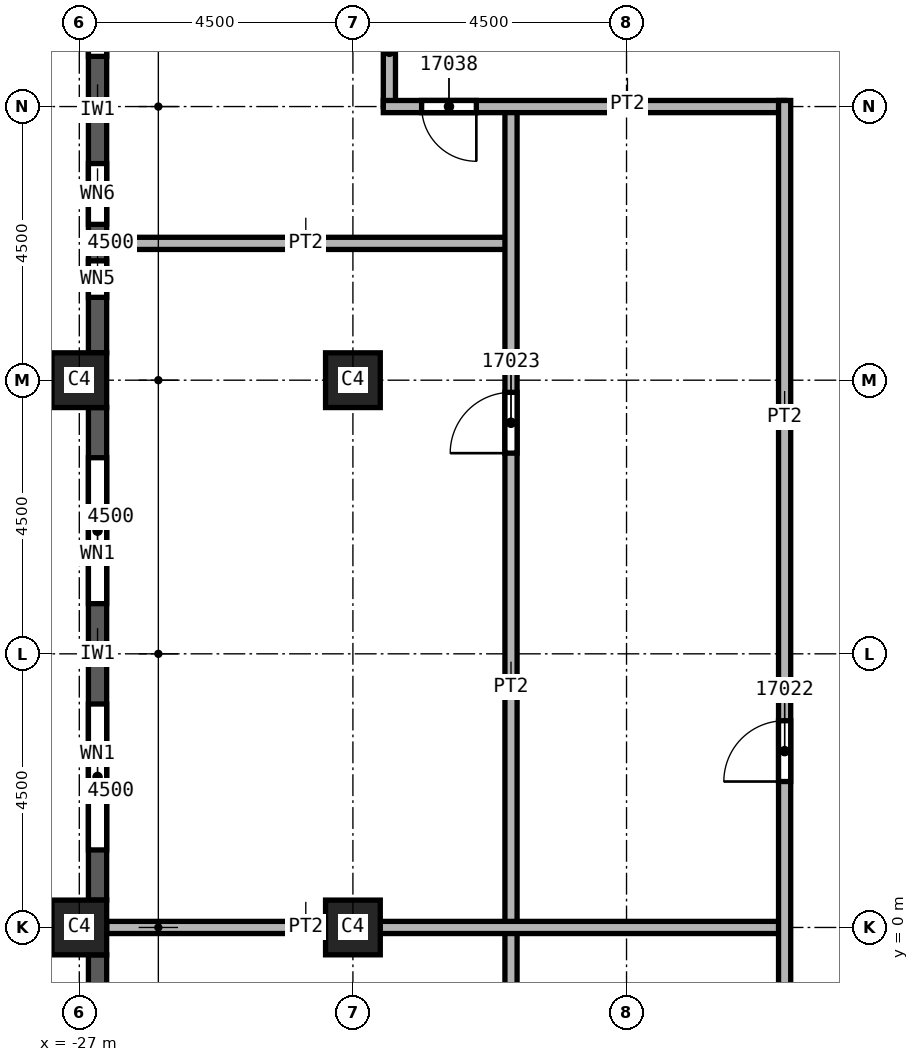
"""IFC4 building model, lengths in metres.
Left out: names, types, materials, properties, quantities, classifications, styles, units other than length and angle.
Written with IfcOpenShell. Run it as: python <this file> out.ifc"""

import sys

from ifc_helpers import new_model, si_unit, direction, frame, frame_2d, origin, origin_2d, place, context, subcontext, project, spatial, rectangle, extrude, element, fill, save


model = new_model("IFC4")
c1 = context("Model", 3, precision=1e-05, world=origin(), true_north=direction((0.0, 1.0)))
c2 = subcontext(c1, "Body", "Model", "MODEL_VIEW")
j1 = project(units=[si_unit("LENGTHUNIT", "METRE"), si_unit("PLANEANGLEUNIT", "RADIAN")], contexts=[c1])
p1 = place(None, origin())
s1 = spatial("IfcSite", under=j1, at=p1, CompositionType="ELEMENT")
p2 = place(p1, origin())
s2 = spatial("IfcBuilding", under=s1, at=p2, CompositionType="ELEMENT")
p3 = place(p2, frame((0.0, 0.0, 254.0)))
s3 = spatial("IfcBuildingStorey", under=s2, at=p3, CompositionType="ELEMENT", Elevation=254.0)
for number, where, z_axis, x_axis in (
    (1, (-22.5, 0.0, 0.0), (0.0, 0.0, 1.0), (1.0, 0.0, 0.0)),
    (2, (-22.5, 9.0, 0.0), (0.0, 0.0, 1.0), (1.0, 0.0, 0.0)),
    (3, (-27.0, 0.0, 0.0), (0.0, 0.0, 1.0), (0.0, 1.0, 0.0)),
    (4, (-27.0, 9.0, 0.0), (0.0, 0.0, 1.0), (0.0, 1.0, 0.0)),
):
    element("IfcColumn", number, at=place(p3, frame(where, z_axis=z_axis, x_axis=x_axis)), inside=s3, PredefinedType="COLUMN", context=c2, shape_type="SweptSolid", body=[
        extrude(rectangle(XDim=0.9, YDim=0.9, at=origin_2d()), origin(), (0.0, 0.0, 1.0), 3.72),
    ])
p4 = place(p3, frame((-26.7, 17.55, 0.0), z_axis=(0.0, 0.0, 1.0), x_axis=(0.0, -1.0, 0.0)))
e5 = element("IfcWall", 5, at=p4, inside=s3, PredefinedType="SOLIDWALL", context=c2, shape_type="SweptSolid", body=[
    extrude(rectangle(XDim=8.1, YDim=0.3, at=frame_2d((4.05, 0.0))), origin(), (0.0, 0.0, 1.0), 3.12),
])
p5 = place(p4, frame((0.825, 0.0, 0.8)))
e6 = element("IfcOpeningElement", 6, at=p5, cuts=e5, PredefinedType="OPENING", context=c2, shape_type="SweptSolid", body=[
    extrude(rectangle(XDim=2.4, YDim=1.95, at=frame_2d((1.2, 0.975))), frame((0.0, 0.15, 0.0), z_axis=(0.0, -1.0, 0.0), x_axis=(1.0, 0.0, 0.0)), (0.0, 0.0, 1.0), 0.3),
])
p6 = place(p4, frame((4.988, 0.0, 0.8)))
e7 = element("IfcOpeningElement", 7, at=p6, cuts=e5, PredefinedType="OPENING", context=c2, shape_type="SweptSolid", body=[
    extrude(rectangle(XDim=1.0, YDim=1.95, at=frame_2d((0.5, 0.975))), frame((0.0, 0.15, 0.0), z_axis=(0.0, -1.0, 0.0), x_axis=(1.0, 0.0, 0.0)), (0.0, 0.0, 1.0), 0.3),
])
p7 = place(p4, frame((6.587, 0.0, 0.8)))
e8 = element("IfcOpeningElement", 8, at=p7, cuts=e5, PredefinedType="OPENING", context=c2, shape_type="SweptSolid", body=[
    extrude(rectangle(XDim=0.6, YDim=1.95, at=frame_2d((0.3, 0.975))), frame((0.0, 0.15, 0.0), z_axis=(0.0, -1.0, 0.0), x_axis=(1.0, 0.0, 0.0)), (0.0, 0.0, 1.0), 0.3),
])
p8 = place(p3, frame((-26.7, 8.55, 0.0), z_axis=(0.0, 0.0, 1.0), x_axis=(0.0, -1.0, 0.0)))
e9 = element("IfcWall", 9, at=p8, inside=s3, PredefinedType="SOLIDWALL", context=c2, shape_type="SweptSolid", body=[
    extrude(rectangle(XDim=8.1, YDim=0.3, at=frame_2d((4.05, 0.0))), origin(), (0.0, 0.0, 1.0), 3.12),
])
p9 = place(p8, frame((0.825, 0.0, 0.8)))
e10 = element("IfcOpeningElement", 10, at=p9, cuts=e9, PredefinedType="OPENING", context=c2, shape_type="SweptSolid", body=[
    extrude(rectangle(XDim=2.4, YDim=1.95, at=frame_2d((1.2, 0.975))), frame((0.0, 0.15, 0.0), z_axis=(0.0, -1.0, 0.0), x_axis=(1.0, 0.0, 0.0)), (0.0, 0.0, 1.0), 0.3),
])
p10 = place(p8, frame((4.875, 0.0, 0.8)))
e11 = element("IfcOpeningElement", 11, at=p10, cuts=e9, PredefinedType="OPENING", context=c2, shape_type="SweptSolid", body=[
    extrude(rectangle(XDim=2.4, YDim=1.95, at=frame_2d((1.2, 0.975))), frame((0.0, 0.15, 0.0), z_axis=(0.0, -1.0, 0.0), x_axis=(1.0, 0.0, 0.0)), (0.0, 0.0, 1.0), 0.3),
])
p11 = place(p3, frame((-26.7, -0.45, 0.0), z_axis=(0.0, 0.0, 1.0), x_axis=(0.0, -1.0, 0.0)))
e12 = element("IfcWall", 12, at=p11, inside=s3, PredefinedType="SOLIDWALL", context=c2, shape_type="SweptSolid", body=[
    extrude(rectangle(XDim=8.1, YDim=0.3, at=frame_2d((4.05, 0.0))), origin(), (0.0, 0.0, 1.0), 3.12),
])
p12 = place(p11, frame((0.825, 0.0, 0.8)))
e13 = element("IfcOpeningElement", 13, at=p12, cuts=e12, PredefinedType="OPENING", context=c2, shape_type="SweptSolid", body=[
    extrude(rectangle(XDim=2.4, YDim=1.95, at=frame_2d((1.2, 0.975))), frame((0.0, 0.15, 0.0), z_axis=(0.0, -1.0, 0.0), x_axis=(1.0, 0.0, 0.0)), (0.0, 0.0, 1.0), 0.3),
])
p13 = place(p11, frame((4.875, 0.0, 0.8)))
e14 = element("IfcOpeningElement", 14, at=p13, cuts=e12, PredefinedType="OPENING", context=c2, shape_type="SweptSolid", body=[
    extrude(rectangle(XDim=2.4, YDim=1.95, at=frame_2d((1.2, 0.975))), frame((0.0, 0.15, 0.0), z_axis=(0.0, -1.0, 0.0), x_axis=(1.0, 0.0, 0.0)), (0.0, 0.0, 1.0), 0.3),
])
p14 = place(p3, frame((-26.55, 11.25, 0.0), z_axis=(0.0, 0.0, 1.0), x_axis=(1.0, 0.0, 0.0)))
e15 = element("IfcWall", 15, at=p14, inside=s3, PredefinedType="PARTITIONING", context=c2, shape_type="SweptSolid", body=[
    extrude(rectangle(XDim=6.65, YDim=0.2, at=frame_2d((3.325, 0.0))), origin(), (0.0, 0.0, 1.0), 3.72),
])
p15 = place(p3, frame((-21.9, 13.5, 0.0), z_axis=(0.0, 0.0, 1.0), x_axis=(0.0, 1.0, 0.0)))
e16 = element("IfcWall", 16, at=p15, inside=s3, PredefinedType="PARTITIONING", context=c2, shape_type="SweptSolid", body=[
    extrude(rectangle(XDim=1.7, YDim=0.2, at=frame_2d((0.85, 0.0))), origin(), (0.0, 0.0, 1.0), 3.72),
])
p16 = place(p3, frame((-19.9, -13.5, 0.0), z_axis=(0.0, 0.0, 1.0), x_axis=(0.0, 1.0, 0.0)))
e17 = element("IfcWall", 17, at=p16, inside=s3, PredefinedType="PARTITIONING", context=c2, shape_type="SweptSolid", body=[
    extrude(rectangle(XDim=27.0, YDim=0.2, at=frame_2d((13.5, 0.0))), origin(), (0.0, 0.0, 1.0), 3.72),
])
p17 = place(p16, frame((21.3, 0.0, 0.0)))
e18 = element("IfcOpeningElement", 18, at=p17, cuts=e17, PredefinedType="OPENING", context=c2, shape_type="SweptSolid", body=[
    extrude(rectangle(XDim=1.0, YDim=2.1, at=frame_2d((0.5, 1.05))), frame((0.0, 0.1, 0.0), z_axis=(0.0, -1.0, 0.0), x_axis=(1.0, 0.0, 0.0)), (0.0, 0.0, 1.0), 0.2),
])
p18 = place(p16, frame((0.25, 0.0, 0.0)))
e19 = element("IfcOpeningElement", 19, at=p18, cuts=e17, PredefinedType="OPENING", context=c2, shape_type="SweptSolid", body=[
    extrude(rectangle(XDim=1.0, YDim=2.1, at=frame_2d((0.5, 1.05))), frame((0.0, 0.1, 0.0), z_axis=(0.0, -1.0, 0.0), x_axis=(1.0, 0.0, 0.0)), (0.0, 0.0, 1.0), 0.2),
])
p19 = place(p3, frame((-15.4, 0.0, 0.0), z_axis=(0.0, 0.0, 1.0), x_axis=(-1.0, 0.0, 0.0)))
e20 = element("IfcWall", 20, at=p19, inside=s3, PredefinedType="PARTITIONING", context=c2, shape_type="SweptSolid", body=[
    extrude(rectangle(XDim=11.15, YDim=0.2, at=frame_2d((5.575, 0.0))), origin(), (0.0, 0.0, 1.0), 3.72),
])
p20 = place(p3, frame((-15.4, 13.5, 0.0), z_axis=(0.0, 0.0, 1.0), x_axis=(-1.0, 0.0, 0.0)))
e21 = element("IfcWall", 21, at=p20, inside=s3, PredefinedType="PARTITIONING", context=c2, shape_type="SweptSolid", body=[
    extrude(rectangle(XDim=6.6, YDim=0.2, at=frame_2d((3.3, 0.0))), origin(), (0.0, 0.0, 1.0), 3.72),
])
p21 = place(p20, frame((5.07, 0.0, 0.0)))
e22 = element("IfcOpeningElement", 22, at=p21, cuts=e21, PredefinedType="OPENING", context=c2, shape_type="SweptSolid", body=[
    extrude(rectangle(XDim=0.9, YDim=2.1, at=frame_2d((0.45, 1.05))), frame((0.0, 0.1, 0.0), z_axis=(0.0, -1.0, 0.0), x_axis=(1.0, 0.0, 0.0)), (0.0, 0.0, 1.0), 0.2),
])
p22 = place(p3, frame((-15.4, -21.9, 0.0), z_axis=(0.0, 0.0, 1.0), x_axis=(0.0, 1.0, 0.0)))
e23 = element("IfcWall", 23, at=p22, inside=s3, PredefinedType="PARTITIONING", context=c2, shape_type="SweptSolid", body=[
    extrude(rectangle(XDim=35.5, YDim=0.2, at=frame_2d((17.75, 0.0))), origin(), (0.0, 0.0, 1.0), 3.72),
])
p23 = place(p22, frame((24.3, 0.0, 0.0)))
e24 = element("IfcOpeningElement", 24, at=p23, cuts=e23, PredefinedType="OPENING", context=c2, shape_type="SweptSolid", body=[
    extrude(rectangle(XDim=1.0, YDim=2.1, at=frame_2d((0.5, 1.05))), frame((0.0, 0.1, 0.0), z_axis=(0.0, -1.0, 0.0), x_axis=(1.0, 0.0, 0.0)), (0.0, 0.0, 1.0), 0.2),
])
p24 = place(p22, frame((2.35, 0.0, 0.0)))
e25 = element("IfcOpeningElement", 25, at=p24, cuts=e23, PredefinedType="OPENING", context=c2, shape_type="SweptSolid", body=[
    extrude(rectangle(XDim=1.0, YDim=2.1, at=frame_2d((0.5, 1.05))), frame((0.0, 0.1, 0.0), z_axis=(0.0, -1.0, 0.0), x_axis=(1.0, 0.0, 0.0)), (0.0, 0.0, 1.0), 0.2),
])
p25 = place(p22, frame((5.7, 0.0, 0.0)))
e26 = element("IfcOpeningElement", 26, at=p25, cuts=e23, PredefinedType="OPENING", context=c2, shape_type="SweptSolid", body=[
    extrude(rectangle(XDim=1.0, YDim=2.1, at=frame_2d((0.5, 1.05))), frame((0.0, 0.1, 0.0), z_axis=(0.0, -1.0, 0.0), x_axis=(1.0, 0.0, 0.0)), (0.0, 0.0, 1.0), 0.2),
])
p26 = place(p22, frame((10.35, 0.0, 0.0)))
e27 = element("IfcOpeningElement", 27, at=p26, cuts=e23, PredefinedType="OPENING", context=c2, shape_type="SweptSolid", body=[
    extrude(rectangle(XDim=1.0, YDim=2.1, at=frame_2d((0.5, 1.05))), frame((0.0, 0.1, 0.0), z_axis=(0.0, -1.0, 0.0), x_axis=(1.0, 0.0, 0.0)), (0.0, 0.0, 1.0), 0.2),
])
p27 = place(p22, frame((16.2, 0.0, 0.0)))
e28 = element("IfcOpeningElement", 28, at=p27, cuts=e23, PredefinedType="OPENING", context=c2, shape_type="SweptSolid", body=[
    extrude(rectangle(XDim=1.0, YDim=2.1, at=frame_2d((0.5, 1.05))), frame((0.0, 0.1, 0.0), z_axis=(0.0, -1.0, 0.0), x_axis=(1.0, 0.0, 0.0)), (0.0, 0.0, 1.0), 0.2),
])
p28 = place(p5, origin())
e29 = element("IfcWindow", 29, at=p28, inside=s3, PartitioningType="SINGLE_PANEL", PredefinedType="WINDOW", context=c2, shape_type="SweptSolid", body=[
    extrude(rectangle(XDim=2.4, YDim=1.95, at=frame_2d((1.2, 0.975))), frame((0.0, 0.03, 0.0), z_axis=(0.0, -1.0, 0.0), x_axis=(1.0, 0.0, 0.0)), (0.0, 0.0, 1.0), 0.06),
])
fill(e6, e29)
p29 = place(p9, origin())
e30 = element("IfcWindow", 30, at=p29, inside=s3, PartitioningType="SINGLE_PANEL", PredefinedType="WINDOW", context=c2, shape_type="SweptSolid", body=[
    extrude(rectangle(XDim=2.4, YDim=1.95, at=frame_2d((1.2, 0.975))), frame((0.0, 0.03, 0.0), z_axis=(0.0, -1.0, 0.0), x_axis=(1.0, 0.0, 0.0)), (0.0, 0.0, 1.0), 0.06),
])
fill(e10, e30)
p30 = place(p10, origin())
e31 = element("IfcWindow", 31, at=p30, inside=s3, PartitioningType="SINGLE_PANEL", PredefinedType="WINDOW", context=c2, shape_type="SweptSolid", body=[
    extrude(rectangle(XDim=2.4, YDim=1.95, at=frame_2d((1.2, 0.975))), frame((0.0, 0.03, 0.0), z_axis=(0.0, -1.0, 0.0), x_axis=(1.0, 0.0, 0.0)), (0.0, 0.0, 1.0), 0.06),
])
fill(e11, e31)
p31 = place(p23, origin())
e32 = element("IfcDoor", 32, at=p31, inside=s3, OperationType="SINGLE_SWING_LEFT", PredefinedType="DOOR", context=c2, shape_type="SweptSolid", body=[
    extrude(rectangle(XDim=1.0, YDim=2.1, at=frame_2d((0.5, 1.05))), frame((0.0, 0.025, 0.0), z_axis=(0.0, -1.0, 0.0), x_axis=(1.0, 0.0, 0.0)), (0.0, 0.0, 1.0), 0.05),
])
fill(e24, e32)
p32 = place(p17, origin())
e33 = element("IfcDoor", 33, at=p32, inside=s3, OperationType="SINGLE_SWING_RIGHT", PredefinedType="DOOR", context=c2, shape_type="SweptSolid", body=[
    extrude(rectangle(XDim=1.0, YDim=2.1, at=frame_2d((0.5, 1.05))), frame((0.0, 0.025, 0.0), z_axis=(0.0, -1.0, 0.0), x_axis=(1.0, 0.0, 0.0)), (0.0, 0.0, 1.0), 0.05),
])
fill(e18, e33)
p33 = place(p21, origin())
e34 = element("IfcDoor", 34, at=p33, inside=s3, OperationType="SINGLE_SWING_LEFT", PredefinedType="DOOR", context=c2, shape_type="SweptSolid", body=[
    extrude(rectangle(XDim=0.9, YDim=2.1, at=frame_2d((0.45, 1.05))), frame((0.0, 0.025, 0.0), z_axis=(0.0, -1.0, 0.0), x_axis=(1.0, 0.0, 0.0)), (0.0, 0.0, 1.0), 0.05),
])
fill(e22, e34)
p34 = place(p6, origin())
e35 = element("IfcWindow", 35, at=p34, inside=s3, PartitioningType="SINGLE_PANEL", PredefinedType="WINDOW", context=c2, shape_type="SweptSolid", body=[
    extrude(rectangle(XDim=1.0, YDim=1.95, at=frame_2d((0.5, 0.975))), frame((0.0, 0.03, 0.0), z_axis=(0.0, -1.0, 0.0), x_axis=(1.0, 0.0, 0.0)), (0.0, 0.0, 1.0), 0.06),
])
fill(e7, e35)
p35 = place(p7, origin())
e36 = element("IfcWindow", 36, at=p35, inside=s3, PartitioningType="SINGLE_PANEL", PredefinedType="WINDOW", context=c2, shape_type="SweptSolid", body=[
    extrude(rectangle(XDim=0.6, YDim=1.95, at=frame_2d((0.3, 0.975))), frame((0.0, 0.03, 0.0), z_axis=(0.0, -1.0, 0.0), x_axis=(1.0, 0.0, 0.0)), (0.0, 0.0, 1.0), 0.06),
])
fill(e8, e36)
save(model, sys.argv[1])
